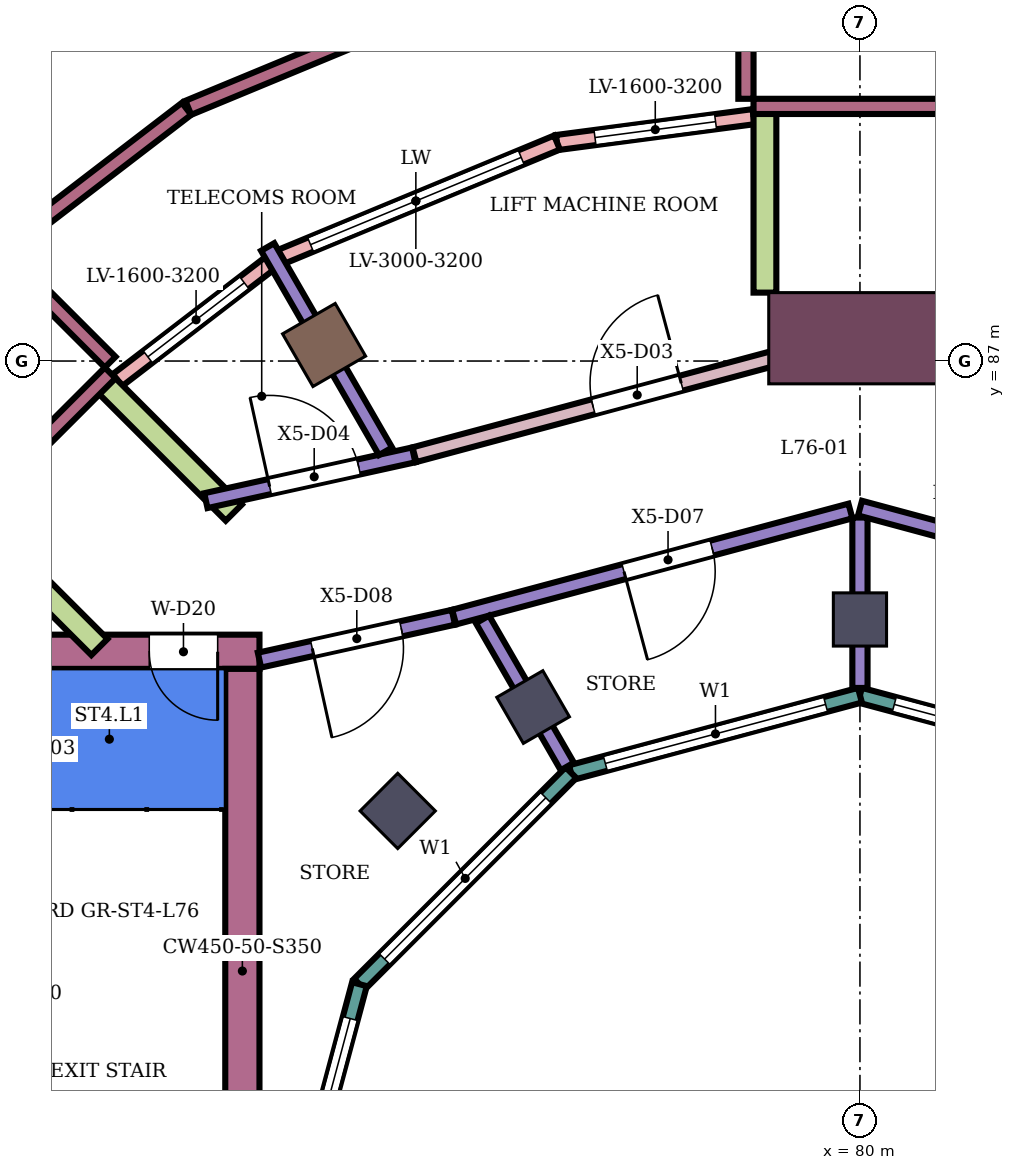
"""IFC4 building model, lengths in metres.
Left out: names, types, materials, properties, quantities, classifications, styles, units other than length and angle.
Written with IfcOpenShell. Run it as: python <this file> out.ifc"""

import sys

from ifc_helpers import new_model, si_unit, direction, frame, frame_2d, origin, origin_2d, place, context, subcontext, project, spatial, rectangle, extrude, element, fill, save


model = new_model("IFC4")
c1 = context("Model", 3, precision=1e-05, world=origin(), true_north=direction((0.0, 1.0)))
c2 = subcontext(c1, "Body", "Model", "MODEL_VIEW")
j1 = project(units=[si_unit("LENGTHUNIT", "METRE"), si_unit("PLANEANGLEUNIT", "RADIAN")], contexts=[c1])
p1 = place(None, origin())
s1 = spatial("IfcSite", under=j1, at=p1, CompositionType="ELEMENT")
p2 = place(p1, origin())
s2 = spatial("IfcBuilding", under=s1, at=p2, CompositionType="ELEMENT")
p3 = place(p2, frame((0.0, 0.0, 333.1)))
s3 = spatial("IfcBuildingStorey", under=s2, at=p3, CompositionType="ELEMENT", Elevation=333.1)
p4 = place(p3, frame((72.95, 87.211, 0.0), z_axis=(0.0, 0.0, 1.0), x_axis=(-0.5, 0.866025403784, 0.0)))
e1 = element("IfcColumn", 1, at=p4, inside=s3, PredefinedType="COLUMN", context=c2, shape_type="SweptSolid", body=[
    extrude(rectangle(XDim=0.8, YDim=0.8, at=origin_2d()), origin(), (0.0, 0.0, 1.0), 4.5),
])
for number, where, z_axis, x_axis in (
    (2, (80.0, 83.6, 0.0), (0.0, 0.0, 1.0), (0.0, 1.0, 0.0)),
    (3, (75.7, 82.448, 0.0), (0.0, 0.0, 1.0), (-0.5, 0.866, 0.0)),
    (4, (73.919, 81.081, 0.0), (0.0, 0.0, 1.0), (-0.707, 0.707, 0.0)),
):
    element("IfcColumn", number, at=place(p3, frame(where, z_axis=z_axis, x_axis=x_axis)), inside=s3, PredefinedType="COLUMN", context=c2, shape_type="SweptSolid", body=[
        extrude(rectangle(XDim=0.7, YDim=0.7, at=origin_2d()), origin(), (0.0, 0.0, 1.0), 4.5),
    ])
p5 = place(p3, frame((80.0, 87.3, 0.0), z_axis=(0.0, 0.0, 1.0), x_axis=(0.0, 1.0, 0.0)))
e5 = element("IfcColumn", 5, at=p5, inside=s3, PredefinedType="COLUMN", context=c2, shape_type="SweptSolid", body=[
    extrude(rectangle(XDim=1.2, YDim=2.4, at=origin_2d()), origin(), (0.0, 0.0, 1.0), 4.5),
])
p6 = place(p3, frame((72.1, 83.175, 0.0), z_axis=(0.0, 0.0, 1.0), x_axis=(-1.0, 0.0, 0.0)))
e6 = element("IfcWall", 6, at=p6, inside=s3, PredefinedType="SHEAR", context=c2, shape_type="SweptSolid", body=[
    extrude(rectangle(XDim=6.3, YDim=0.45, at=frame_2d((3.15, 0.0))), origin(), (0.0, 0.0, 1.0), 4.15),
])
p7 = place(p6, frame((0.55, 0.0, 0.0)))
e7 = element("IfcOpeningElement", 7, at=p7, cuts=e6, PredefinedType="OPENING", context=c2, shape_type="SweptSolid", body=[
    extrude(rectangle(XDim=0.9, YDim=2.1, at=frame_2d((0.45, 1.05))), frame((0.0, 0.235, 0.0), z_axis=(0.0, -1.0, 0.0), x_axis=(1.0, 0.0, 0.0)), (0.0, 0.0, 1.0), 0.47),
])
p8 = place(p3, frame((71.875, 82.95, 0.0), z_axis=(0.0, 0.0, 1.0), x_axis=(0.0, -1.0, 0.0)))
e8 = element("IfcWall", 8, at=p8, inside=s3, PredefinedType="SHEAR", context=c2, shape_type="SweptSolid", body=[
    extrude(rectangle(XDim=7.95, YDim=0.45, at=frame_2d((3.975, 0.0))), origin(), (0.0, 0.0, 1.0), 4.15),
])
p9 = place(p3, frame((78.6, 90.215, 0.0), z_axis=(0.0, 0.0, 1.0), x_axis=(-0.991448878041, -0.130495678972, 0.0)))
e9 = element("IfcWall", 9, at=p9, inside=s3, PredefinedType="NOTDEFINED", context=c2, shape_type="SweptSolid", body=[
    extrude(rectangle(XDim=2.608, YDim=0.2, at=frame_2d((1.304, 0.0))), origin(), (0.0, 0.0, 1.0), 4.5),
])
p10 = place(p9, frame((0.504, 0.0, 0.5)))
e10 = element("IfcOpeningElement", 10, at=p10, cuts=e9, PredefinedType="OPENING", context=c2, shape_type="SweptSolid", body=[
    extrude(rectangle(XDim=1.6, YDim=3.2, at=frame_2d((0.8, 1.6))), frame((0.0, 0.11, 0.0), z_axis=(0.0, -1.0, 0.0), x_axis=(1.0, 0.0, 0.0)), (0.0, 0.0, 1.0), 0.22),
])
p11 = place(p3, frame((76.014, 89.875, 0.0), z_axis=(0.0, 0.0, 1.0), x_axis=(-0.923858417842, -0.38273440371, 0.0)))
e11 = element("IfcWall", 11, at=p11, inside=s3, PredefinedType="NOTDEFINED", context=c2, shape_type="SweptSolid", body=[
    extrude(rectangle(XDim=4.02, YDim=0.2, at=frame_2d((2.01, 0.0))), origin(), (0.0, 0.0, 1.0), 4.5),
])
p12 = place(p11, frame((0.51, 0.0, 0.5)))
e12 = element("IfcOpeningElement", 12, at=p12, cuts=e11, PredefinedType="OPENING", context=c2, shape_type="SweptSolid", body=[
    extrude(rectangle(XDim=3.0, YDim=3.2, at=frame_2d((1.5, 1.6))), frame((0.0, 0.11, 0.0), z_axis=(0.0, -1.0, 0.0), x_axis=(1.0, 0.0, 0.0)), (0.0, 0.0, 1.0), 0.22),
])
p13 = place(p3, frame((72.301, 88.336, 0.0), z_axis=(0.0, 0.0, 1.0), x_axis=(-0.793402901715, -0.608696833859, 0.0)))
e13 = element("IfcWall", 13, at=p13, inside=s3, PredefinedType="NOTDEFINED", context=c2, shape_type="SweptSolid", body=[
    extrude(rectangle(XDim=2.608, YDim=0.2, at=frame_2d((1.304, 0.0))), origin(), (0.0, 0.0, 1.0), 4.5),
])
p14 = place(p13, frame((0.504, 0.0, 0.5)))
e14 = element("IfcOpeningElement", 14, at=p14, cuts=e13, PredefinedType="OPENING", context=c2, shape_type="SweptSolid", body=[
    extrude(rectangle(XDim=1.6, YDim=3.2, at=frame_2d((0.8, 1.6))), frame((0.0, 0.11, 0.0), z_axis=(0.0, -1.0, 0.0), x_axis=(1.0, 0.0, 0.0)), (0.0, 0.0, 1.0), 0.22),
])
for number, where, z_axis, x_axis in (
    (15, (78.75, 87.9, 0.0), (0.0, 0.0, 1.0), (0.0, 1.0, 0.0)),
    (16, (71.762, 85.006, 0.0), (0.0, 0.0, 1.0), (-0.707, 0.707, 0.0)),
    (17, (69.994, 83.238, 0.0), (0.0, 0.0, 1.0), (-0.707, 0.707, 0.0)),
):
    element("IfcWall", number, at=place(p3, frame(where, z_axis=z_axis, x_axis=x_axis)), inside=s3, PredefinedType="NOTDEFINED", context=c2, shape_type="SweptSolid", body=[
        extrude(rectangle(XDim=2.416, YDim=0.3, at=frame_2d((1.208, 0.0))), origin(), (0.0, 0.0, 1.0), 4.5),
    ])
p15 = place(p3, frame((83.802, 81.585, 0.0), z_axis=(0.0, 0.0, 1.0), x_axis=(-0.965933654434, 0.258789828301, 0.0)))
e18 = element("IfcWall", 18, at=p15, inside=s3, PredefinedType="NOTDEFINED", context=c2, shape_type="SweptSolid", body=[
    extrude(rectangle(XDim=3.936, YDim=0.2, at=frame_2d((1.968, 0.0))), origin(), (0.0, 0.0, 1.0), 4.5),
])
p16 = place(p15, frame((0.468, 0.0, 0.9)))
e19 = element("IfcOpeningElement", 19, at=p16, cuts=e18, PredefinedType="OPENING", context=c2, shape_type="SweptSolid", body=[
    extrude(rectangle(XDim=3.0, YDim=2.3, at=frame_2d((1.5, 1.15))), frame((0.0, 0.11, 0.0), z_axis=(0.0, -1.0, 0.0), x_axis=(1.0, 0.0, 0.0)), (0.0, 0.0, 1.0), 0.22),
])
p17 = place(p3, frame((80.0, 82.604, 0.0), z_axis=(0.0, 0.0, 1.0), x_axis=(-0.965933654434, -0.258789828301, 0.0)))
e20 = element("IfcWall", 20, at=p17, inside=s3, PredefinedType="NOTDEFINED", context=c2, shape_type="SweptSolid", body=[
    extrude(rectangle(XDim=3.936, YDim=0.2, at=frame_2d((1.968, 0.0))), origin(), (0.0, 0.0, 1.0), 4.5),
])
p18 = place(p17, frame((0.468, 0.0, 0.9)))
e21 = element("IfcOpeningElement", 21, at=p18, cuts=e20, PredefinedType="OPENING", context=c2, shape_type="SweptSolid", body=[
    extrude(rectangle(XDim=3.0, YDim=2.3, at=frame_2d((1.5, 1.15))), frame((0.0, 0.11, 0.0), z_axis=(0.0, -1.0, 0.0), x_axis=(1.0, 0.0, 0.0)), (0.0, 0.0, 1.0), 0.22),
])
p19 = place(p3, frame((76.198, 81.585, 0.0), z_axis=(0.0, 0.0, 1.0), x_axis=(-0.707106781187, -0.707106781187, 0.0)))
e22 = element("IfcWall", 22, at=p19, inside=s3, PredefinedType="NOTDEFINED", context=c2, shape_type="SweptSolid", body=[
    extrude(rectangle(XDim=3.936, YDim=0.2, at=frame_2d((1.968, 0.0))), origin(), (0.0, 0.0, 1.0), 4.5),
])
p20 = place(p19, frame((0.468, 0.0, 0.9)))
e23 = element("IfcOpeningElement", 23, at=p20, cuts=e22, PredefinedType="OPENING", context=c2, shape_type="SweptSolid", body=[
    extrude(rectangle(XDim=3.0, YDim=2.3, at=frame_2d((1.5, 1.15))), frame((0.0, 0.11, 0.0), z_axis=(0.0, -1.0, 0.0), x_axis=(1.0, 0.0, 0.0)), (0.0, 0.0, 1.0), 0.22),
])
p21 = place(p3, frame((73.415, 78.802, 0.0), z_axis=(0.0, 0.0, 1.0), x_axis=(-0.258789828301, -0.965933654434, 0.0)))
e24 = element("IfcWall", 24, at=p21, inside=s3, PredefinedType="NOTDEFINED", context=c2, shape_type="SweptSolid", body=[
    extrude(rectangle(XDim=3.936, YDim=0.2, at=frame_2d((1.968, 0.0))), origin(), (0.0, 0.0, 1.0), 4.5),
])
p22 = place(p21, frame((0.468, 0.0, 0.9)))
e25 = element("IfcOpeningElement", 25, at=p22, cuts=e24, PredefinedType="OPENING", context=c2, shape_type="SweptSolid", body=[
    extrude(rectangle(XDim=3.0, YDim=2.3, at=frame_2d((1.5, 1.15))), frame((0.0, 0.11, 0.0), z_axis=(0.0, -1.0, 0.0), x_axis=(1.0, 0.0, 0.0)), (0.0, 0.0, 1.0), 0.22),
])
p23 = place(p3, frame((68.156, 84.864, 0.0), z_axis=(0.0, 0.0, 1.0), x_axis=(0.707106781187, 0.707106781187, 0.0)))
e26 = element("IfcWall", 26, at=p23, inside=s3, PredefinedType="PARAPET", context=c2, shape_type="SweptSolid", body=[
    extrude(rectangle(XDim=2.8, YDim=0.2, at=frame_2d((1.4, 0.0))), origin(), (0.0, 0.0, 1.0), 1.1),
])
p24 = place(p3, frame((70.136, 86.985, 0.0), z_axis=(0.0, 0.0, 1.0), x_axis=(-0.707043717037, 0.707169839712, 0.0)))
e27 = element("IfcWall", 27, at=p24, inside=s3, PredefinedType="PARAPET", context=c2, shape_type="SweptSolid", body=[
    extrude(rectangle(XDim=1.936, YDim=0.2, at=frame_2d((0.968, 0.0))), origin(), (0.0, 0.0, 1.0), 1.1),
])
p25 = place(p3, frame((68.777, 88.504, 0.0), z_axis=(0.0, 0.0, 1.0), x_axis=(0.79335441758, 0.608760025056, 0.0)))
e28 = element("IfcWall", 28, at=p25, inside=s3, PredefinedType="PARAPET", context=c2, shape_type="SweptSolid", body=[
    extrude(rectangle(XDim=2.98, YDim=0.2, at=frame_2d((1.49, 0.0))), origin(), (0.0, 0.0, 1.0), 1.1),
])
p26 = place(p3, frame((71.164, 90.332, 0.0), z_axis=(0.0, 0.0, 1.0), x_axis=(0.923884687805, 0.382670986147, 0.0)))
e29 = element("IfcWall", 29, at=p26, inside=s3, PredefinedType="PARAPET", context=c2, shape_type="SweptSolid", body=[
    extrude(rectangle(XDim=4.594, YDim=0.2, at=frame_2d((2.297, 0.0))), origin(), (0.0, 0.0, 1.0), 1.1),
])
p27 = place(p3, frame((78.5, 92.386, 0.0), z_axis=(0.0, 0.0, 1.0), x_axis=(0.0, -1.0, 0.0)))
e30 = element("IfcWall", 30, at=p27, inside=s3, PredefinedType="PARAPET", context=c2, shape_type="SweptSolid", body=[
    extrude(rectangle(XDim=1.936, YDim=0.2, at=frame_2d((0.968, 0.0))), origin(), (0.0, 0.0, 1.0), 1.1),
])
p28 = place(p3, frame((78.6, 90.35, 0.0), z_axis=(0.0, 0.0, 1.0), x_axis=(1.0, 0.0, 0.0)))
e31 = element("IfcWall", 31, at=p28, inside=s3, PredefinedType="PARAPET", context=c2, shape_type="SweptSolid", body=[
    extrude(rectangle(XDim=2.8, YDim=0.2, at=frame_2d((1.4, 0.0))), origin(), (0.0, 0.0, 1.0), 1.1),
])
p29 = place(p3, frame((71.395, 85.163, 0.0), z_axis=(0.0, 0.0, 1.0), x_axis=(0.976593576861, 0.215092969745, 0.0)))
e32 = element("IfcWall", 32, at=p29, inside=s3, PredefinedType="PARTITIONING", context=c2, shape_type="SweptSolid", body=[
    extrude(rectangle(XDim=2.8, YDim=0.2, at=frame_2d((1.4, 0.0))), origin(), (0.0, 0.0, 1.0), 4.05),
])
p30 = place(p29, frame((0.859, 0.0, 0.0)))
e33 = element("IfcOpeningElement", 33, at=p30, cuts=e32, PredefinedType="OPENING", context=c2, shape_type="SweptSolid", body=[
    extrude(rectangle(XDim=1.2, YDim=2.4, at=frame_2d((0.6, 1.2))), frame((0.0, 0.11, 0.0), z_axis=(0.0, -1.0, 0.0), x_axis=(1.0, 0.0, 0.0)), (0.0, 0.0, 1.0), 0.22),
])
p31 = place(p3, frame((72.1, 83.065, 0.0), z_axis=(0.0, 0.0, 1.0), x_axis=(0.976423939717, 0.215861738037, 0.0)))
e34 = element("IfcWall", 34, at=p31, inside=s3, PredefinedType="PARTITIONING", context=c2, shape_type="SweptSolid", body=[
    extrude(rectangle(XDim=2.613, YDim=0.2, at=frame_2d((1.306, 0.0))), origin(), (0.0, 0.0, 1.0), 4.05),
])
p32 = place(p31, frame((0.711, 0.0, 0.0)))
e35 = element("IfcOpeningElement", 35, at=p32, cuts=e34, PredefinedType="OPENING", context=c2, shape_type="SweptSolid", body=[
    extrude(rectangle(XDim=1.2, YDim=2.4, at=frame_2d((0.6, 1.2))), frame((0.0, 0.11, 0.0), z_axis=(0.0, -1.0, 0.0), x_axis=(1.0, 0.0, 0.0)), (0.0, 0.0, 1.0), 0.22),
])
p33 = place(p3, frame((72.208, 88.5, 0.0), z_axis=(0.0, 0.0, 1.0), x_axis=(0.499692942151, -0.866202611151, 0.0)))
e36 = element("IfcWall", 36, at=p33, inside=s3, PredefinedType="PARTITIONING", context=c2, shape_type="SweptSolid", body=[
    extrude(rectangle(XDim=3.104, YDim=0.2, at=frame_2d((1.552, 0.0))), origin(), (0.0, 0.0, 1.0), 4.05),
])
p34 = place(p3, frame((74.139, 85.768, 0.0), z_axis=(0.0, 0.0, 1.0), x_axis=(0.965901504328, 0.258909798842, 0.0)))
e37 = element("IfcWall", 37, at=p34, inside=s3, PredefinedType="PARTITIONING", context=c2, shape_type="SweptSolid", body=[
    extrude(rectangle(XDim=6.018, YDim=0.2, at=frame_2d((3.009, 0.0))), origin(), (0.0, 0.0, 1.0), 3.35),
])
p35 = place(p34, frame((2.434, 0.0, 0.0)))
e38 = element("IfcOpeningElement", 38, at=p35, cuts=e37, PredefinedType="OPENING", context=c2, shape_type="SweptSolid", body=[
    extrude(rectangle(XDim=1.2, YDim=2.4, at=frame_2d((0.6, 1.2))), frame((0.0, 0.11, 0.0), z_axis=(0.0, -1.0, 0.0), x_axis=(1.0, 0.0, 0.0)), (0.0, 0.0, 1.0), 0.22),
])
p36 = place(p3, frame((74.661, 83.631, 0.0), z_axis=(0.0, 0.0, 1.0), x_axis=(0.965971667126, 0.258647904127, 0.0)))
e39 = element("IfcWall", 39, at=p36, inside=s3, PredefinedType="PARTITIONING", context=c2, shape_type="SweptSolid", body=[
    extrude(rectangle(XDim=5.397, YDim=0.2, at=frame_2d((2.699, 0.0))), origin(), (0.0, 0.0, 1.0), 4.05),
])
p37 = place(p36, frame((2.313, 0.0, 0.0)))
e40 = element("IfcOpeningElement", 40, at=p37, cuts=e39, PredefinedType="OPENING", context=c2, shape_type="SweptSolid", body=[
    extrude(rectangle(XDim=1.2, YDim=2.4, at=frame_2d((0.6, 1.2))), frame((0.0, 0.11, 0.0), z_axis=(0.0, -1.0, 0.0), x_axis=(1.0, 0.0, 0.0)), (0.0, 0.0, 1.0), 0.22),
])
p38 = place(p3, frame((75.034, 83.601, 0.0), z_axis=(0.0, 0.0, 1.0), x_axis=(0.499643577634, -0.866231086563, 0.0)))
e41 = element("IfcWall", 41, at=p38, inside=s3, PredefinedType="PARTITIONING", context=c2, shape_type="SweptSolid", body=[
    extrude(rectangle(XDim=2.233, YDim=0.2, at=frame_2d((1.117, 0.0))), origin(), (0.0, 0.0, 1.0), 4.05),
])
p39 = place(p3, frame((80.0, 82.699, 0.0), z_axis=(0.0, 0.0, 1.0), x_axis=(0.0, 1.0, 0.0)))
e42 = element("IfcWall", 42, at=p39, inside=s3, PredefinedType="PARTITIONING", context=c2, shape_type="SweptSolid", body=[
    extrude(rectangle(XDim=2.242, YDim=0.2, at=frame_2d((1.121, 0.0))), origin(), (0.0, 0.0, 1.0), 4.05),
])
p40 = place(p3, frame((80.0, 87.339, 0.0), z_axis=(0.0, 0.0, 1.0), x_axis=(0.96586472806, -0.259046959234, 0.0)))
e43 = element("IfcWall", 43, at=p40, inside=s3, PredefinedType="PARTITIONING", context=c2, shape_type="SweptSolid", body=[
    extrude(rectangle(XDim=6.058, YDim=0.2, at=frame_2d((3.029, 0.0))), origin(), (0.0, 0.0, 1.0), 3.35),
])
p41 = place(p40, frame((4.021, 0.0, 0.0)))
e44 = element("IfcOpeningElement", 44, at=p41, cuts=e43, PredefinedType="OPENING", context=c2, shape_type="SweptSolid", body=[
    extrude(rectangle(XDim=1.2, YDim=2.4, at=frame_2d((0.6, 1.2))), frame((0.0, 0.11, 0.0), z_axis=(0.0, -1.0, 0.0), x_axis=(1.0, 0.0, 0.0)), (0.0, 0.0, 1.0), 0.22),
])
p42 = place(p40, frame((1.457, 0.0, 0.0)))
e45 = element("IfcOpeningElement", 45, at=p42, cuts=e43, PredefinedType="OPENING", context=c2, shape_type="SweptSolid", body=[
    extrude(rectangle(XDim=1.2, YDim=2.4, at=frame_2d((0.6, 1.2))), frame((0.0, 0.11, 0.0), z_axis=(0.0, -1.0, 0.0), x_axis=(1.0, 0.0, 0.0)), (0.0, 0.0, 1.0), 0.22),
])
p43 = place(p3, frame((80.001, 85.065, 0.0), z_axis=(0.0, 0.0, 1.0), x_axis=(0.965552921813, -0.260206754675, 0.0)))
e46 = element("IfcWall", 46, at=p43, inside=s3, PredefinedType="PARTITIONING", context=c2, shape_type="SweptSolid", body=[
    extrude(rectangle(XDim=5.517, YDim=0.2, at=frame_2d((2.758, 0.0))), origin(), (0.0, 0.0, 1.0), 4.05),
])
p44 = place(p43, frame((2.014, 0.0, 0.0)))
e47 = element("IfcOpeningElement", 47, at=p44, cuts=e46, PredefinedType="OPENING", context=c2, shape_type="SweptSolid", body=[
    extrude(rectangle(XDim=1.2, YDim=2.4, at=frame_2d((0.6, 1.2))), frame((0.0, 0.11, 0.0), z_axis=(0.0, -1.0, 0.0), x_axis=(1.0, 0.0, 0.0)), (0.0, 0.0, 1.0), 0.22),
])
p45 = place(p10, origin())
e48 = element("IfcWindow", 48, at=p45, inside=s3, PartitioningType="SINGLE_PANEL", PredefinedType="USERDEFINED", context=c2, shape_type="SweptSolid", body=[
    extrude(rectangle(XDim=1.6, YDim=3.2, at=frame_2d((0.8, 1.6))), frame((0.0, 0.03, 0.0), z_axis=(0.0, -1.0, 0.0), x_axis=(1.0, 0.0, 0.0)), (0.0, 0.0, 1.0), 0.06),
])
fill(e10, e48)
p46 = place(p12, origin())
e49 = element("IfcWindow", 49, at=p46, inside=s3, PartitioningType="SINGLE_PANEL", PredefinedType="USERDEFINED", context=c2, shape_type="SweptSolid", body=[
    extrude(rectangle(XDim=3.0, YDim=3.2, at=frame_2d((1.5, 1.6))), frame((0.0, 0.03, 0.0), z_axis=(0.0, -1.0, 0.0), x_axis=(1.0, 0.0, 0.0)), (0.0, 0.0, 1.0), 0.06),
])
fill(e12, e49)
p47 = place(p14, origin())
e50 = element("IfcWindow", 50, at=p47, inside=s3, PartitioningType="SINGLE_PANEL", PredefinedType="USERDEFINED", context=c2, shape_type="SweptSolid", body=[
    extrude(rectangle(XDim=1.6, YDim=3.2, at=frame_2d((0.8, 1.6))), frame((0.0, 0.03, 0.0), z_axis=(0.0, -1.0, 0.0), x_axis=(1.0, 0.0, 0.0)), (0.0, 0.0, 1.0), 0.06),
])
fill(e14, e50)
p48 = place(p16, origin())
e51 = element("IfcWindow", 51, at=p48, inside=s3, PartitioningType="SINGLE_PANEL", PredefinedType="WINDOW", context=c2, shape_type="SweptSolid", body=[
    extrude(rectangle(XDim=3.0, YDim=2.3, at=frame_2d((1.5, 1.15))), frame((0.0, 0.03, 0.0), z_axis=(0.0, -1.0, 0.0), x_axis=(1.0, 0.0, 0.0)), (0.0, 0.0, 1.0), 0.06),
])
fill(e19, e51)
p49 = place(p18, origin())
e52 = element("IfcWindow", 52, at=p49, inside=s3, PartitioningType="SINGLE_PANEL", PredefinedType="WINDOW", context=c2, shape_type="SweptSolid", body=[
    extrude(rectangle(XDim=3.0, YDim=2.3, at=frame_2d((1.5, 1.15))), frame((0.0, 0.03, 0.0), z_axis=(0.0, -1.0, 0.0), x_axis=(1.0, 0.0, 0.0)), (0.0, 0.0, 1.0), 0.06),
])
fill(e21, e52)
p50 = place(p20, origin())
e53 = element("IfcWindow", 53, at=p50, inside=s3, PartitioningType="SINGLE_PANEL", PredefinedType="WINDOW", context=c2, shape_type="SweptSolid", body=[
    extrude(rectangle(XDim=3.0, YDim=2.3, at=frame_2d((1.5, 1.15))), frame((0.0, 0.03, 0.0), z_axis=(0.0, -1.0, 0.0), x_axis=(1.0, 0.0, 0.0)), (0.0, 0.0, 1.0), 0.06),
])
fill(e23, e53)
p51 = place(p22, origin())
e54 = element("IfcWindow", 54, at=p51, inside=s3, PartitioningType="SINGLE_PANEL", PredefinedType="WINDOW", context=c2, shape_type="SweptSolid", body=[
    extrude(rectangle(XDim=3.0, YDim=2.3, at=frame_2d((1.5, 1.15))), frame((0.0, 0.03, 0.0), z_axis=(0.0, -1.0, 0.0), x_axis=(1.0, 0.0, 0.0)), (0.0, 0.0, 1.0), 0.06),
])
fill(e25, e54)
p52 = place(p35, origin())
e55 = element("IfcDoor", 55, at=p52, inside=s3, OperationType="SINGLE_SWING_RIGHT", PredefinedType="DOOR", context=c2, shape_type="SweptSolid", body=[
    extrude(rectangle(XDim=1.2, YDim=2.4, at=frame_2d((0.6, 1.2))), frame((0.0, 0.025, 0.0), z_axis=(0.0, -1.0, 0.0), x_axis=(1.0, 0.0, 0.0)), (0.0, 0.0, 1.0), 0.05),
])
fill(e38, e55)
p53 = place(p30, origin())
e56 = element("IfcDoor", 56, at=p53, inside=s3, OperationType="SINGLE_SWING_LEFT", PredefinedType="DOOR", context=c2, shape_type="SweptSolid", body=[
    extrude(rectangle(XDim=1.2, YDim=2.4, at=frame_2d((0.6, 1.2))), frame((0.0, 0.025, 0.0), z_axis=(0.0, -1.0, 0.0), x_axis=(1.0, 0.0, 0.0)), (0.0, 0.0, 1.0), 0.05),
])
fill(e33, e56)
p54 = place(p37, frame((1.2, 0.0, 0.0), z_axis=(0.0, 0.0, 1.0), x_axis=(-1.0, 0.0, 0.0)))
e57 = element("IfcDoor", 57, at=p54, inside=s3, OperationType="SINGLE_SWING_RIGHT", PredefinedType="DOOR", context=c2, shape_type="SweptSolid", body=[
    extrude(rectangle(XDim=1.2, YDim=2.4, at=frame_2d((0.6, 1.2))), frame((0.0, 0.025, 0.0), z_axis=(0.0, -1.0, 0.0), x_axis=(1.0, 0.0, 0.0)), (0.0, 0.0, 1.0), 0.05),
])
fill(e40, e57)
p55 = place(p32, frame((1.2, 0.0, 0.0), z_axis=(0.0, 0.0, 1.0), x_axis=(-1.0, 0.0, 0.0)))
e58 = element("IfcDoor", 58, at=p55, inside=s3, OperationType="SINGLE_SWING_RIGHT", PredefinedType="DOOR", context=c2, shape_type="SweptSolid", body=[
    extrude(rectangle(XDim=1.2, YDim=2.4, at=frame_2d((0.6, 1.2))), frame((0.0, 0.025, 0.0), z_axis=(0.0, -1.0, 0.0), x_axis=(1.0, 0.0, 0.0)), (0.0, 0.0, 1.0), 0.05),
])
fill(e35, e58)
p56 = place(p7, origin())
e59 = element("IfcDoor", 59, at=p56, inside=s3, OperationType="SINGLE_SWING_LEFT", PredefinedType="DOOR", context=c2, shape_type="SweptSolid", body=[
    extrude(rectangle(XDim=0.9, YDim=2.1, at=frame_2d((0.45, 1.05))), frame((0.0, 0.025, 0.0), z_axis=(0.0, -1.0, 0.0), x_axis=(1.0, 0.0, 0.0)), (0.0, 0.0, 1.0), 0.05),
])
fill(e7, e59)
save(model, sys.argv[1])
